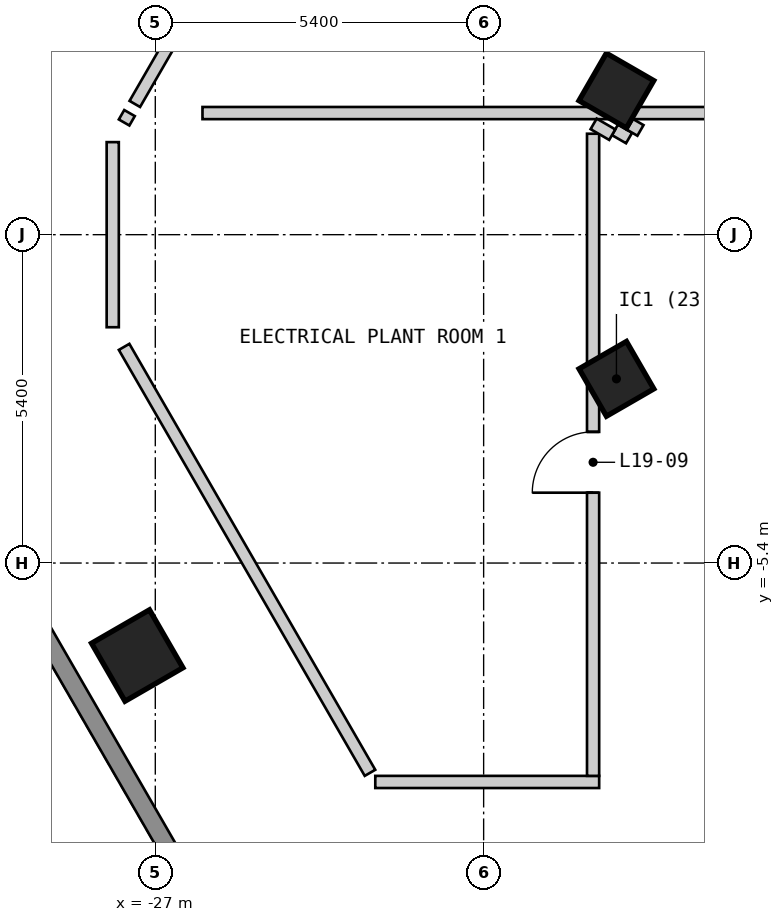
"""IFC4 building model, lengths in metres.
Left out: names, types, materials, properties, quantities, classifications, styles, units other than length and angle.
Written with IfcOpenShell. Run it as: python <this file> out.ifc"""

import sys

from ifc_helpers import new_model, si_unit, direction, frame, frame_2d, origin, origin_2d, place, context, subcontext, project, spatial, polyline, rectangle, outline, extrude, element, fill, save


model = new_model("IFC4")
c1 = context("Model", 3, precision=1e-05, world=origin(), true_north=direction((0.0, 1.0)))
c2 = subcontext(c1, "Body", "Model", "MODEL_VIEW")
j1 = project(units=[si_unit("LENGTHUNIT", "METRE"), si_unit("PLANEANGLEUNIT", "RADIAN")], contexts=[c1])
p1 = place(None, origin())
s1 = spatial("IfcSite", under=j1, at=p1, CompositionType="ELEMENT")
p2 = place(p1, origin())
s2 = spatial("IfcBuilding", under=s1, at=p2, CompositionType="ELEMENT")
p3 = place(p2, frame((0.0, 0.0, 62.4)))
s3 = spatial("IfcBuildingStorey", under=s2, at=p3, CompositionType="ELEMENT", Elevation=62.4)
p4 = place(p3, frame((-27.297, -6.921, 0.0), z_axis=(0.0, 0.0, 1.0), x_axis=(0.499984884929, -0.866034130299, 0.0)))
e1 = element("IfcColumn", 1, at=p4, inside=s3, PredefinedType="COLUMN", context=c2, shape_type="SweptSolid", body=[
    extrude(rectangle(XDim=1.1, YDim=1.1, at=origin_2d()), origin(), (0.0, 0.0, 1.0), 2.6),
])
for number, where, z_axis, x_axis in (
    (2, (-19.416, -2.371, 0.0), (0.0, 0.0, 1.0), (0.5, -0.866, 0.0)),
    (3, (-19.417, 2.369, 0.0), (0.0, 0.0, 1.0), (-0.5, -0.866, 0.0)),
):
    element("IfcColumn", number, at=place(p3, frame(where, z_axis=z_axis, x_axis=x_axis)), inside=s3, PredefinedType="COLUMN", context=c2, shape_type="SweptSolid", body=[
        extrude(rectangle(XDim=0.9, YDim=0.9, at=origin_2d()), origin(), (0.0, 0.0, 1.0), 3.6),
    ])
for number, where, z_axis, x_axis in (
    (4, (-17.71, 25.825, 0.0), (0.0, 0.0, 1.0), (-0.5, -0.866, 0.0)),
    (5, (-31.22, -2.425, 0.0), (0.0, 0.0, 1.0), (0.5, -0.866, 0.0)),
):
    element("IfcWall", number, at=place(p3, frame(where, z_axis=z_axis, x_axis=x_axis)), inside=s3, PredefinedType="SOLIDWALL", context=c2, shape_type="SweptSolid", body=[
        extrude(outline(polyline([(0.0, -0.15), (27.02, -0.15), (26.94, 0.15), (0.08, 0.15), (0.0, -0.15)])), origin(), (0.0, 0.0, 1.0), 2.6),
    ])
p5 = place(p3, frame((-23.382, -9.0, 0.0), z_axis=(0.0, 0.0, 1.0), x_axis=(1.0, 0.0, 0.0)))
e6 = element("IfcWall", 6, at=p5, inside=s3, PredefinedType="SOLIDWALL", context=c2, shape_type="SweptSolid", body=[
    extrude(rectangle(XDim=3.682, YDim=0.2, at=frame_2d((1.841, 0.0))), origin(), (0.0, 0.0, 1.0), 2.6),
])
p6 = place(p3, frame((-26.224, 2.0, 0.0), z_axis=(0.0, 0.0, 1.0), x_axis=(1.0, 0.0, 0.0)))
e7 = element("IfcWall", 7, at=p6, inside=s3, PredefinedType="SOLIDWALL", context=c2, shape_type="SweptSolid", body=[
    extrude(rectangle(XDim=53.248, YDim=0.2, at=frame_2d((26.624, 0.0))), origin(), (0.0, 0.0, 1.0), 2.6),
])
p7 = place(p6, frame((9.188, 0.0, 0.0)))
e8 = element("IfcOpeningElement", 8, at=p7, cuts=e7, PredefinedType="OPENING", context=c2, shape_type="SweptSolid", body=[
    extrude(rectangle(XDim=1.8, YDim=2.1, at=frame_2d((0.9, 1.05))), frame((0.0, 0.11, 0.0), z_axis=(0.0, -1.0, 0.0), x_axis=(1.0, 0.0, 0.0)), (0.0, 0.0, 1.0), 0.22),
])
p8 = place(p6, frame((40.124, 0.0, 0.0)))
e9 = element("IfcOpeningElement", 9, at=p8, cuts=e7, PredefinedType="OPENING", context=c2, shape_type="SweptSolid", body=[
    extrude(rectangle(XDim=1.0, YDim=2.1, at=frame_2d((0.5, 1.05))), frame((0.0, 0.11, 0.0), z_axis=(0.0, -1.0, 0.0), x_axis=(1.0, 0.0, 0.0)), (0.0, 0.0, 1.0), 0.22),
])
p9 = place(p6, frame((30.811, 0.0, 0.0)))
e10 = element("IfcOpeningElement", 10, at=p9, cuts=e7, PredefinedType="OPENING", context=c2, shape_type="SweptSolid", body=[
    extrude(rectangle(XDim=1.8, YDim=2.1, at=frame_2d((0.9, 1.05))), frame((0.0, 0.11, 0.0), z_axis=(0.0, -1.0, 0.0), x_axis=(1.0, 0.0, 0.0)), (0.0, 0.0, 1.0), 0.22),
])
p10 = place(p3, frame((-27.7, -1.522, 0.0), z_axis=(0.0, 0.0, 1.0), x_axis=(0.0, 1.0, 0.0)))
e11 = element("IfcWall", 11, at=p10, inside=s3, PredefinedType="SOLIDWALL", context=c2, shape_type="SweptSolid", body=[
    extrude(rectangle(XDim=3.044, YDim=0.2, at=frame_2d((1.522, 0.0))), origin(), (0.0, 0.0, 1.0), 2.6),
])
p11 = place(p3, frame((-19.8, -8.9, 0.0), z_axis=(0.0, 0.0, 1.0), x_axis=(0.0, 1.0, 0.0)))
e12 = element("IfcWall", 12, at=p11, inside=s3, PredefinedType="SOLIDWALL", context=c2, shape_type="SweptSolid", body=[
    extrude(rectangle(XDim=10.56, YDim=0.2, at=frame_2d((5.28, 0.0))), origin(), (0.0, 0.0, 1.0), 2.6),
])
p12 = place(p11, frame((4.657, 0.0, 0.0)))
e13 = element("IfcOpeningElement", 13, at=p12, cuts=e12, PredefinedType="OPENING", context=c2, shape_type="SweptSolid", body=[
    extrude(rectangle(XDim=1.0, YDim=2.1, at=frame_2d((0.5, 1.05))), frame((0.0, 0.11, 0.0), z_axis=(0.0, -1.0, 0.0), x_axis=(1.0, 0.0, 0.0)), (0.0, 0.0, 1.0), 0.22),
])
p13 = place(p3, frame((-19.44, 1.724, 0.0), z_axis=(0.0, 0.0, 1.0), x_axis=(0.865821204386, -0.500353517061, 0.0)))
e14 = element("IfcWall", 14, at=p13, inside=s3, PredefinedType="SOLIDWALL", context=c2, shape_type="SweptSolid", body=[
    extrude(rectangle(XDim=0.268, YDim=0.2, at=frame_2d((0.134, 0.0))), origin(), (0.0, 0.0, 1.0), 2.6),
])
p14 = place(p3, frame((-19.791, 1.822, 0.0), z_axis=(0.0, 0.0, 1.0), x_axis=(0.865552376308, -0.500818414065, 0.0)))
e15 = element("IfcWall", 15, at=p14, inside=s3, PredefinedType="SOLIDWALL", context=c2, shape_type="SweptSolid", body=[
    extrude(rectangle(XDim=0.354, YDim=0.2, at=frame_2d((0.177, 0.0))), origin(), (0.0, 0.0, 1.0), 2.6),
])
p15 = place(p3, frame((-27.513, -1.845, 0.0), z_axis=(0.0, 0.0, 1.0), x_axis=(0.499956732914, -0.866050382607, 0.0)))
e16 = element("IfcWall", 16, at=p15, inside=s3, PredefinedType="SOLIDWALL", context=c2, shape_type="SweptSolid", body=[
    extrude(rectangle(XDim=8.089, YDim=0.2, at=frame_2d((4.044, 0.0))), origin(), (0.0, 0.0, 1.0), 2.6),
])
p16 = place(p3, frame((-27.513, 1.845, 0.0), z_axis=(0.0, 0.0, 1.0), x_axis=(0.497315560673, 0.867569728098, 0.0)))
e17 = element("IfcWall", 17, at=p16, inside=s3, PredefinedType="SOLIDWALL", context=c2, shape_type="SweptSolid", body=[
    extrude(rectangle(XDim=0.179, YDim=0.2, at=frame_2d((0.089, 0.0))), origin(), (0.0, 0.0, 1.0), 2.6),
])
p17 = place(p3, frame((-27.337, 2.15, 0.0), z_axis=(0.0, 0.0, 1.0), x_axis=(0.499962711661, 0.866046931147, 0.0)))
e18 = element("IfcWall", 18, at=p17, inside=s3, PredefinedType="SOLIDWALL", context=c2, shape_type="SweptSolid", body=[
    extrude(rectangle(XDim=11.2, YDim=0.2, at=frame_2d((5.6, 0.0))), origin(), (0.0, 0.0, 1.0), 2.6),
])
p18 = place(p3, frame((-19.158, 1.677, 0.0), z_axis=(0.0, 0.0, 1.0), x_axis=(0.500036104519, 0.866004557827, 0.0)))
e19 = element("IfcWall", 19, at=p18, inside=s3, PredefinedType="SOLIDWALL", context=c2, shape_type="SweptSolid", body=[
    extrude(rectangle(XDim=0.202, YDim=0.2, at=frame_2d((0.101, 0.0))), origin(), (0.0, 0.0, 1.0), 2.6),
])
p19 = place(p12, origin())
e20 = element("IfcDoor", 20, at=p19, inside=s3, OperationType="SINGLE_SWING_LEFT", PredefinedType="DOOR", context=c2, shape_type="SweptSolid", body=[
    extrude(rectangle(XDim=1.0, YDim=2.1, at=frame_2d((0.5, 1.05))), frame((0.0, 0.025, 0.0), z_axis=(0.0, -1.0, 0.0), x_axis=(1.0, 0.0, 0.0)), (0.0, 0.0, 1.0), 0.05),
])
fill(e13, e20)
save(model, sys.argv[1])
